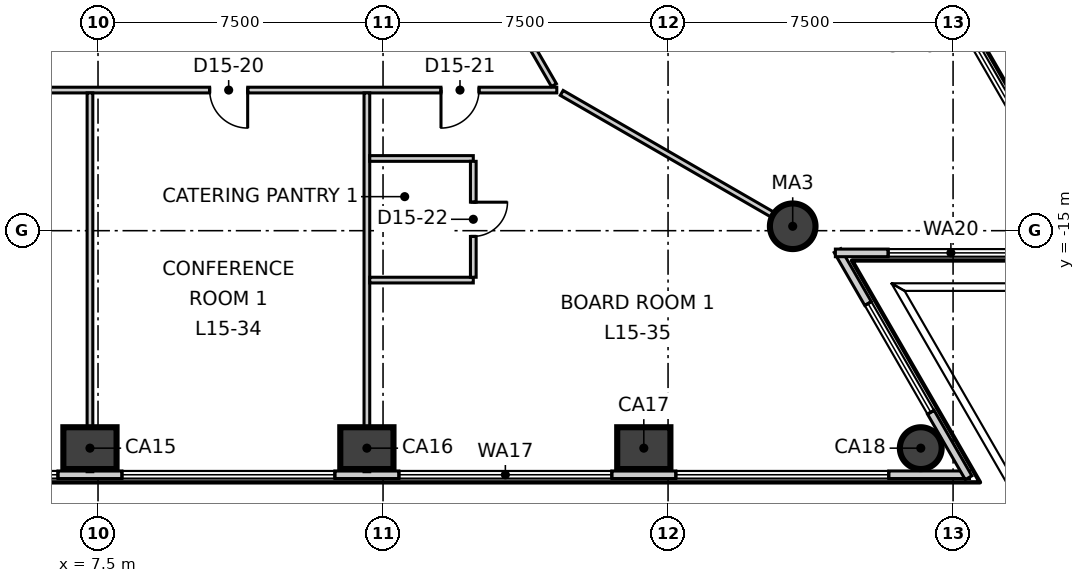
"""IFC4 building model, lengths in metres.
Left out: names, types, materials, properties, quantities, classifications, styles, units other than length and angle.
Written with IfcOpenShell. Run it as: python <this file> out.ifc"""

import sys

from ifc_helpers import new_model, si_unit, direction, frame, frame_2d, origin, origin_2d, place, context, subcontext, project, spatial, rectangle, circle, extrude, element, fill, save


model = new_model("IFC4")
c1 = context("Model", 3, precision=1e-05, world=origin(), true_north=direction((0.0, 1.0)))
c2 = subcontext(c1, "Body", "Model", "MODEL_VIEW")
j1 = project(units=[si_unit("LENGTHUNIT", "METRE"), si_unit("PLANEANGLEUNIT", "RADIAN")], contexts=[c1])
p1 = place(None, origin())
s1 = spatial("IfcSite", under=j1, at=p1, CompositionType="ELEMENT")
p2 = place(p1, origin())
s2 = spatial("IfcBuilding", under=s1, at=p2, CompositionType="ELEMENT")
p3 = place(p2, frame((0.0, 0.0, 71.3)))
s3 = spatial("IfcBuildingStorey", under=s2, at=p3, CompositionType="ELEMENT", Elevation=71.3)
for number, where, z_axis, x_axis in (
    (1, (7.288, -20.722, -0.3), (0.0, 0.0, 1.0), (1.0, 0.0, 0.0)),
    (2, (14.575, -20.722, -0.3), (0.0, 0.0, 1.0), (1.0, 0.0, 0.0)),
    (3, (21.862, -20.722, -0.3), (0.0, 0.0, 1.0), (1.0, 0.0, 0.0)),
):
    element("IfcColumn", number, at=place(p3, frame(where, z_axis=z_axis, x_axis=x_axis)), inside=s3, PredefinedType="COLUMN", context=c2, shape_type="SweptSolid", body=[
        extrude(rectangle(XDim=1.4, YDim=1.1, at=origin_2d()), origin(), (0.0, 0.0, 1.0), 4.0),
    ])
p4 = place(p3, frame((29.15, -20.722, -0.3), z_axis=(0.0, 0.0, 1.0), x_axis=(1.0, 0.0, 0.0)))
e4 = element("IfcColumn", 4, at=p4, inside=s3, PredefinedType="COLUMN", context=c2, shape_type="SweptSolid", body=[
    extrude(circle(Radius=0.55, at=origin_2d()), origin(), (0.0, 0.0, 1.0), 4.0),
])
p5 = place(p3, frame((25.78, -14.884, -0.3), z_axis=(0.0, 0.0, 1.0), x_axis=(1.0, 0.0, 0.0)))
e5 = element("IfcColumn", 5, at=p5, inside=s3, PredefinedType="COLUMN", context=c2, shape_type="SweptSolid", body=[
    extrude(circle(Radius=0.6, at=origin_2d()), origin(), (0.0, 0.0, 1.0), 4.0),
])
p6 = place(p3, frame((-30.453, -21.422, 0.0), z_axis=(0.0, 0.0, 1.0), x_axis=(1.0, 0.0, 0.0)))
e6 = element("IfcWall", 6, at=p6, inside=s3, PredefinedType="ELEMENTEDWALL", context=c2, shape_type="SweptSolid", body=[
    extrude(rectangle(XDim=60.886, YDim=0.2, at=frame_2d((30.443, 0.0))), origin(), (0.0, 0.0, 1.0), 3.7),
])
p7 = place(p6, frame((2.147, 0.0, 0.9)))
e7 = element("IfcOpeningElement", 7, at=p7, cuts=e6, PredefinedType="OPENING", context=c2, shape_type="SweptSolid", body=[
    extrude(rectangle(XDim=5.6, YDim=2.5, at=frame_2d((2.8, 1.25))), frame((0.0, 0.11, 0.0), z_axis=(0.0, -1.0, 0.0), x_axis=(1.0, 0.0, 0.0)), (0.0, 0.0, 1.0), 0.22),
])
p8 = place(p6, frame((9.434, 0.0, 0.9)))
e8 = element("IfcOpeningElement", 8, at=p8, cuts=e6, PredefinedType="OPENING", context=c2, shape_type="SweptSolid", body=[
    extrude(rectangle(XDim=5.6, YDim=2.5, at=frame_2d((2.8, 1.25))), frame((0.0, 0.11, 0.0), z_axis=(0.0, -1.0, 0.0), x_axis=(1.0, 0.0, 0.0)), (0.0, 0.0, 1.0), 0.22),
])
p9 = place(p6, frame((16.722, 0.0, 0.9)))
e9 = element("IfcOpeningElement", 9, at=p9, cuts=e6, PredefinedType="OPENING", context=c2, shape_type="SweptSolid", body=[
    extrude(rectangle(XDim=5.6, YDim=2.5, at=frame_2d((2.8, 1.25))), frame((0.0, 0.11, 0.0), z_axis=(0.0, -1.0, 0.0), x_axis=(1.0, 0.0, 0.0)), (0.0, 0.0, 1.0), 0.22),
])
p10 = place(p6, frame((24.009, 0.0, 0.9)))
e10 = element("IfcOpeningElement", 10, at=p10, cuts=e6, PredefinedType="OPENING", context=c2, shape_type="SweptSolid", body=[
    extrude(rectangle(XDim=5.6, YDim=2.5, at=frame_2d((2.8, 1.25))), frame((0.0, 0.11, 0.0), z_axis=(0.0, -1.0, 0.0), x_axis=(1.0, 0.0, 0.0)), (0.0, 0.0, 1.0), 0.22),
])
p11 = place(p6, frame((31.297, 0.0, 0.9)))
e11 = element("IfcOpeningElement", 11, at=p11, cuts=e6, PredefinedType="OPENING", context=c2, shape_type="SweptSolid", body=[
    extrude(rectangle(XDim=5.6, YDim=2.5, at=frame_2d((2.8, 1.25))), frame((0.0, 0.11, 0.0), z_axis=(0.0, -1.0, 0.0), x_axis=(1.0, 0.0, 0.0)), (0.0, 0.0, 1.0), 0.22),
])
p12 = place(p6, frame((38.584, 0.0, 0.9)))
e12 = element("IfcOpeningElement", 12, at=p12, cuts=e6, PredefinedType="OPENING", context=c2, shape_type="SweptSolid", body=[
    extrude(rectangle(XDim=5.6, YDim=2.5, at=frame_2d((2.8, 1.25))), frame((0.0, 0.11, 0.0), z_axis=(0.0, -1.0, 0.0), x_axis=(1.0, 0.0, 0.0)), (0.0, 0.0, 1.0), 0.22),
])
p13 = place(p6, frame((45.872, 0.0, 0.9)))
e13 = element("IfcOpeningElement", 13, at=p13, cuts=e6, PredefinedType="OPENING", context=c2, shape_type="SweptSolid", body=[
    extrude(rectangle(XDim=5.6, YDim=2.5, at=frame_2d((2.8, 1.25))), frame((0.0, 0.11, 0.0), z_axis=(0.0, -1.0, 0.0), x_axis=(1.0, 0.0, 0.0)), (0.0, 0.0, 1.0), 0.22),
])
p14 = place(p6, frame((53.159, 0.0, 0.9)))
e14 = element("IfcOpeningElement", 14, at=p14, cuts=e6, PredefinedType="OPENING", context=c2, shape_type="SweptSolid", body=[
    extrude(rectangle(XDim=5.6, YDim=2.5, at=frame_2d((2.8, 1.25))), frame((0.0, 0.11, 0.0), z_axis=(0.0, -1.0, 0.0), x_axis=(1.0, 0.0, 0.0)), (0.0, 0.0, 1.0), 0.22),
])
p15 = place(p3, frame((30.408, -21.5, 0.0), z_axis=(0.0, 0.0, 1.0), x_axis=(-0.499902111801, 0.866081912187, 0.0)))
e15 = element("IfcWall", 15, at=p15, inside=s3, PredefinedType="ELEMENTEDWALL", context=c2, shape_type="SweptSolid", body=[
    extrude(rectangle(XDim=6.901, YDim=0.2, at=frame_2d((3.451, 0.0))), origin(), (0.0, 0.0, 1.0), 3.7),
])
p16 = place(p15, frame((1.99, 0.0, 0.9)))
e16 = element("IfcOpeningElement", 16, at=p16, cuts=e15, PredefinedType="OPENING", context=c2, shape_type="SweptSolid", body=[
    extrude(rectangle(XDim=3.3, YDim=2.5, at=frame_2d((1.65, 1.25))), frame((0.0, 0.11, 0.0), z_axis=(0.0, -1.0, 0.0), x_axis=(1.0, 0.0, 0.0)), (0.0, 0.0, 1.0), 0.22),
])
p17 = place(p3, frame((26.903, -15.584, 0.0), z_axis=(0.0, 0.0, 1.0), x_axis=(1.0, 0.0, 0.0)))
e17 = element("IfcWall", 17, at=p17, inside=s3, PredefinedType="ELEMENTEDWALL", context=c2, shape_type="SweptSolid", body=[
    extrude(rectangle(XDim=6.901, YDim=0.2, at=frame_2d((3.45, 0.0))), origin(), (0.0, 0.0, 1.0), 3.7),
])
p18 = place(p17, frame((1.39, 0.0, 0.9)))
e18 = element("IfcOpeningElement", 18, at=p18, cuts=e17, PredefinedType="OPENING", context=c2, shape_type="SweptSolid", body=[
    extrude(rectangle(XDim=3.3, YDim=2.5, at=frame_2d((1.65, 1.25))), frame((0.0, 0.11, 0.0), z_axis=(0.0, -1.0, 0.0), x_axis=(1.0, 0.0, 0.0)), (0.0, 0.0, 1.0), 0.22),
])
p19 = place(p3, frame((33.779, -15.662, 0.0), z_axis=(0.0, 0.0, 1.0), x_axis=(-0.500000131003, 0.86602532815, 0.0)))
e19 = element("IfcWall", 19, at=p19, inside=s3, PredefinedType="ELEMENTEDWALL", context=c2, shape_type="SweptSolid", body=[
    extrude(rectangle(XDim=60.886, YDim=0.2, at=frame_2d((30.443, 0.0))), origin(), (0.0, 0.0, 1.0), 3.7),
])
p20 = place(p19, frame((2.147, 0.0, 0.9)))
e20 = element("IfcOpeningElement", 20, at=p20, cuts=e19, PredefinedType="OPENING", context=c2, shape_type="SweptSolid", body=[
    extrude(rectangle(XDim=5.6, YDim=2.5, at=frame_2d((2.8, 1.25))), frame((0.0, 0.11, 0.0), z_axis=(0.0, -1.0, 0.0), x_axis=(1.0, 0.0, 0.0)), (0.0, 0.0, 1.0), 0.22),
])
p21 = place(p19, frame((9.434, 0.0, 0.9)))
e21 = element("IfcOpeningElement", 21, at=p21, cuts=e19, PredefinedType="OPENING", context=c2, shape_type="SweptSolid", body=[
    extrude(rectangle(XDim=5.6, YDim=2.5, at=frame_2d((2.8, 1.25))), frame((0.0, 0.11, 0.0), z_axis=(0.0, -1.0, 0.0), x_axis=(1.0, 0.0, 0.0)), (0.0, 0.0, 1.0), 0.22),
])
p22 = place(p19, frame((16.722, 0.0, 0.9)))
e22 = element("IfcOpeningElement", 22, at=p22, cuts=e19, PredefinedType="OPENING", context=c2, shape_type="SweptSolid", body=[
    extrude(rectangle(XDim=5.6, YDim=2.5, at=frame_2d((2.8, 1.25))), frame((0.0, 0.11, 0.0), z_axis=(0.0, -1.0, 0.0), x_axis=(1.0, 0.0, 0.0)), (0.0, 0.0, 1.0), 0.22),
])
p23 = place(p19, frame((24.009, 0.0, 0.9)))
e23 = element("IfcOpeningElement", 23, at=p23, cuts=e19, PredefinedType="OPENING", context=c2, shape_type="SweptSolid", body=[
    extrude(rectangle(XDim=5.6, YDim=2.5, at=frame_2d((2.8, 1.25))), frame((0.0, 0.11, 0.0), z_axis=(0.0, -1.0, 0.0), x_axis=(1.0, 0.0, 0.0)), (0.0, 0.0, 1.0), 0.22),
])
p24 = place(p19, frame((31.297, 0.0, 0.9)))
e24 = element("IfcOpeningElement", 24, at=p24, cuts=e19, PredefinedType="OPENING", context=c2, shape_type="SweptSolid", body=[
    extrude(rectangle(XDim=5.6, YDim=2.5, at=frame_2d((2.8, 1.25))), frame((0.0, 0.11, 0.0), z_axis=(0.0, -1.0, 0.0), x_axis=(1.0, 0.0, 0.0)), (0.0, 0.0, 1.0), 0.22),
])
p25 = place(p19, frame((38.584, 0.0, 0.9)))
e25 = element("IfcOpeningElement", 25, at=p25, cuts=e19, PredefinedType="OPENING", context=c2, shape_type="SweptSolid", body=[
    extrude(rectangle(XDim=5.6, YDim=2.5, at=frame_2d((2.8, 1.25))), frame((0.0, 0.11, 0.0), z_axis=(0.0, -1.0, 0.0), x_axis=(1.0, 0.0, 0.0)), (0.0, 0.0, 1.0), 0.22),
])
p26 = place(p19, frame((45.872, 0.0, 0.9)))
e26 = element("IfcOpeningElement", 26, at=p26, cuts=e19, PredefinedType="OPENING", context=c2, shape_type="SweptSolid", body=[
    extrude(rectangle(XDim=5.6, YDim=2.5, at=frame_2d((2.8, 1.25))), frame((0.0, 0.11, 0.0), z_axis=(0.0, -1.0, 0.0), x_axis=(1.0, 0.0, 0.0)), (0.0, 0.0, 1.0), 0.22),
])
p27 = place(p19, frame((53.16, 0.0, 0.9)))
e27 = element("IfcOpeningElement", 27, at=p27, cuts=e19, PredefinedType="OPENING", context=c2, shape_type="SweptSolid", body=[
    extrude(rectangle(XDim=5.6, YDim=2.5, at=frame_2d((2.8, 1.25))), frame((0.0, 0.11, 0.0), z_axis=(0.0, -1.0, 0.0), x_axis=(1.0, 0.0, 0.0)), (0.0, 0.0, 1.0), 0.22),
])
p28 = place(p3, frame((-19.422, -11.3, 0.0), z_axis=(0.0, 0.0, 1.0), x_axis=(1.0, 0.0, 0.0)))
e28 = element("IfcWall", 28, at=p28, inside=s3, PredefinedType="PARTITIONING", context=c2, shape_type="SweptSolid", body=[
    extrude(rectangle(XDim=38.994, YDim=0.15, at=frame_2d((19.497, 0.0))), origin(), (0.0, 0.0, 1.0), 3.7),
])
p29 = place(p28, frame((1.8, 0.0, 0.0)))
e29 = element("IfcOpeningElement", 29, at=p29, cuts=e28, PredefinedType="OPENING", context=c2, shape_type="SweptSolid", body=[
    extrude(rectangle(XDim=1.1, YDim=2.1, at=frame_2d((0.55, 1.05))), frame((0.0, 0.085, 0.0), z_axis=(0.0, -1.0, 0.0), x_axis=(1.0, 0.0, 0.0)), (0.0, 0.0, 1.0), 0.17),
])
p30 = place(p28, frame((9.197, 0.0, 0.0)))
e30 = element("IfcOpeningElement", 30, at=p30, cuts=e28, PredefinedType="OPENING", context=c2, shape_type="SweptSolid", body=[
    extrude(rectangle(XDim=1.0, YDim=2.1, at=frame_2d((0.5, 1.05))), frame((0.0, 0.085, 0.0), z_axis=(0.0, -1.0, 0.0), x_axis=(1.0, 0.0, 0.0)), (0.0, 0.0, 1.0), 0.17),
])
p31 = place(p28, frame((5.597, 0.0, 0.0)))
e31 = element("IfcOpeningElement", 31, at=p31, cuts=e28, PredefinedType="OPENING", context=c2, shape_type="SweptSolid", body=[
    extrude(rectangle(XDim=0.9, YDim=2.1, at=frame_2d((0.45, 1.05))), frame((0.0, 0.085, 0.0), z_axis=(0.0, -1.0, 0.0), x_axis=(1.0, 0.0, 0.0)), (0.0, 0.0, 1.0), 0.17),
])
p32 = place(p28, frame((23.284, 0.0, 0.0)))
e32 = element("IfcOpeningElement", 32, at=p32, cuts=e28, PredefinedType="OPENING", context=c2, shape_type="SweptSolid", body=[
    extrude(rectangle(XDim=1.1, YDim=2.1, at=frame_2d((0.55, 1.05))), frame((0.0, 0.085, 0.0), z_axis=(0.0, -1.0, 0.0), x_axis=(1.0, 0.0, 0.0)), (0.0, 0.0, 1.0), 0.17),
])
p33 = place(p28, frame((13.284, 0.0, 0.0)))
e33 = element("IfcOpeningElement", 33, at=p33, cuts=e28, PredefinedType="OPENING", context=c2, shape_type="SweptSolid", body=[
    extrude(rectangle(XDim=0.9, YDim=2.1, at=frame_2d((0.45, 1.05))), frame((0.0, 0.085, 0.0), z_axis=(0.0, -1.0, 0.0), x_axis=(1.0, 0.0, 0.0)), (0.0, 0.0, 1.0), 0.17),
])
p34 = place(p28, frame((16.484, 0.0, 0.0)))
e34 = element("IfcOpeningElement", 34, at=p34, cuts=e28, PredefinedType="OPENING", context=c2, shape_type="SweptSolid", body=[
    extrude(rectangle(XDim=0.9, YDim=2.1, at=frame_2d((0.45, 1.05))), frame((0.0, 0.085, 0.0), z_axis=(0.0, -1.0, 0.0), x_axis=(1.0, 0.0, 0.0)), (0.0, 0.0, 1.0), 0.17),
])
p35 = place(p28, frame((19.184, 0.0, 0.0)))
e35 = element("IfcOpeningElement", 35, at=p35, cuts=e28, PredefinedType="OPENING", context=c2, shape_type="SweptSolid", body=[
    extrude(rectangle(XDim=1.0, YDim=2.1, at=frame_2d((0.5, 1.05))), frame((0.0, 0.085, 0.0), z_axis=(0.0, -1.0, 0.0), x_axis=(1.0, 0.0, 0.0)), (0.0, 0.0, 1.0), 0.17),
])
p36 = place(p28, frame((29.86, 0.0, 0.0)))
e36 = element("IfcOpeningElement", 36, at=p36, cuts=e28, PredefinedType="OPENING", context=c2, shape_type="SweptSolid", body=[
    extrude(rectangle(XDim=1.0, YDim=2.1, at=frame_2d((0.5, 1.05))), frame((0.0, 0.085, 0.0), z_axis=(0.0, -1.0, 0.0), x_axis=(1.0, 0.0, 0.0)), (0.0, 0.0, 1.0), 0.17),
])
p37 = place(p28, frame((35.947, 0.0, 0.0)))
e37 = element("IfcOpeningElement", 37, at=p37, cuts=e28, PredefinedType="OPENING", context=c2, shape_type="SweptSolid", body=[
    extrude(rectangle(XDim=1.0, YDim=2.1, at=frame_2d((0.5, 1.05))), frame((0.0, 0.085, 0.0), z_axis=(0.0, -1.0, 0.0), x_axis=(1.0, 0.0, 0.0)), (0.0, 0.0, 1.0), 0.17),
])
p38 = place(p3, frame((19.702, -11.375, 0.0), z_axis=(0.0, 0.0, 1.0), x_axis=(0.866029632557, -0.499992675479, 0.0)))
e38 = element("IfcWall", 38, at=p38, inside=s3, PredefinedType="PARTITIONING", context=c2, shape_type="SweptSolid", body=[
    extrude(rectangle(XDim=7.638, YDim=0.15, at=frame_2d((3.819, 0.0))), origin(), (0.0, 0.0, 1.0), 3.1),
])
p39 = place(p3, frame((0.075, 22.47, 0.0), z_axis=(0.0, 0.0, 1.0), x_axis=(0.500002280369, -0.866024087209, 0.0)))
e39 = element("IfcWall", 39, at=p39, inside=s3, PredefinedType="PARTITIONING", context=c2, shape_type="SweptSolid", body=[
    extrude(rectangle(XDim=38.844, YDim=0.15, at=frame_2d((19.422, 0.0))), origin(), (0.0, 0.0, 1.0), 3.7),
])
p40 = place(p39, frame((35.944, 0.0, 0.0)))
e40 = element("IfcOpeningElement", 40, at=p40, cuts=e39, PredefinedType="OPENING", context=c2, shape_type="SweptSolid", body=[
    extrude(rectangle(XDim=1.1, YDim=2.1, at=frame_2d((0.55, 1.05))), frame((0.0, 0.085, 0.0), z_axis=(0.0, -1.0, 0.0), x_axis=(1.0, 0.0, 0.0)), (0.0, 0.0, 1.0), 0.17),
])
p41 = place(p39, frame((29.848, 0.0, 0.0)))
e41 = element("IfcOpeningElement", 41, at=p41, cuts=e39, PredefinedType="OPENING", context=c2, shape_type="SweptSolid", body=[
    extrude(rectangle(XDim=1.0, YDim=2.1, at=frame_2d((0.5, 1.05))), frame((0.0, 0.085, 0.0), z_axis=(0.0, -1.0, 0.0), x_axis=(1.0, 0.0, 0.0)), (0.0, 0.0, 1.0), 0.17),
])
p42 = place(p39, frame((14.46, 0.0, 0.0)))
e42 = element("IfcOpeningElement", 42, at=p42, cuts=e39, PredefinedType="OPENING", context=c2, shape_type="SweptSolid", body=[
    extrude(rectangle(XDim=1.1, YDim=2.1, at=frame_2d((0.55, 1.05))), frame((0.0, 0.085, 0.0), z_axis=(0.0, -1.0, 0.0), x_axis=(1.0, 0.0, 0.0)), (0.0, 0.0, 1.0), 0.17),
])
p43 = place(p39, frame((24.66, 0.0, 0.0)))
e43 = element("IfcOpeningElement", 43, at=p43, cuts=e39, PredefinedType="OPENING", context=c2, shape_type="SweptSolid", body=[
    extrude(rectangle(XDim=0.9, YDim=2.1, at=frame_2d((0.45, 1.05))), frame((0.0, 0.085, 0.0), z_axis=(0.0, -1.0, 0.0), x_axis=(1.0, 0.0, 0.0)), (0.0, 0.0, 1.0), 0.17),
])
p44 = place(p39, frame((21.46, 0.0, 0.0)))
e44 = element("IfcOpeningElement", 44, at=p44, cuts=e39, PredefinedType="OPENING", context=c2, shape_type="SweptSolid", body=[
    extrude(rectangle(XDim=0.9, YDim=2.1, at=frame_2d((0.45, 1.05))), frame((0.0, 0.085, 0.0), z_axis=(0.0, -1.0, 0.0), x_axis=(1.0, 0.0, 0.0)), (0.0, 0.0, 1.0), 0.17),
])
p45 = place(p39, frame((18.66, 0.0, 0.0)))
e45 = element("IfcOpeningElement", 45, at=p45, cuts=e39, PredefinedType="OPENING", context=c2, shape_type="SweptSolid", body=[
    extrude(rectangle(XDim=1.0, YDim=2.1, at=frame_2d((0.5, 1.05))), frame((0.0, 0.085, 0.0), z_axis=(0.0, -1.0, 0.0), x_axis=(1.0, 0.0, 0.0)), (0.0, 0.0, 1.0), 0.17),
])
p46 = place(p39, frame((6.785, 0.0, 0.0)))
e46 = element("IfcOpeningElement", 46, at=p46, cuts=e39, PredefinedType="OPENING", context=c2, shape_type="SweptSolid", body=[
    extrude(rectangle(XDim=1.0, YDim=2.1, at=frame_2d((0.5, 1.05))), frame((0.0, 0.085, 0.0), z_axis=(0.0, -1.0, 0.0), x_axis=(1.0, 0.0, 0.0)), (0.0, 0.0, 1.0), 0.17),
])
p47 = place(p39, frame((10.485, 0.0, 0.0)))
e47 = element("IfcOpeningElement", 47, at=p47, cuts=e39, PredefinedType="OPENING", context=c2, shape_type="SweptSolid", body=[
    extrude(rectangle(XDim=0.9, YDim=2.1, at=frame_2d((0.45, 1.05))), frame((0.0, 0.085, 0.0), z_axis=(0.0, -1.0, 0.0), x_axis=(1.0, 0.0, 0.0)), (0.0, 0.0, 1.0), 0.17),
])
p48 = place(p39, frame((1.796, 0.0, 0.0)))
e48 = element("IfcOpeningElement", 48, at=p48, cuts=e39, PredefinedType="OPENING", context=c2, shape_type="SweptSolid", body=[
    extrude(rectangle(XDim=1.1, YDim=2.1, at=frame_2d((0.55, 1.05))), frame((0.0, 0.085, 0.0), z_axis=(0.0, -1.0, 0.0), x_axis=(1.0, 0.0, 0.0)), (0.0, 0.0, 1.0), 0.17),
])
for number, where, z_axis, x_axis in (
    (49, (7.288, -21.342, 0.0), (0.0, 0.0, 1.0), (0.0, 1.0, 0.0)),
    (50, (14.575, -21.342, 0.0), (0.0, 0.0, 1.0), (0.0, 1.0, 0.0)),
):
    element("IfcWall", number, at=place(p3, frame(where, z_axis=z_axis, x_axis=x_axis)), inside=s3, PredefinedType="PARTITIONING", context=c2, shape_type="SweptSolid", body=[
        extrude(rectangle(XDim=9.967, YDim=0.15, at=frame_2d((4.983, 0.0))), origin(), (0.0, 0.0, 1.0), 3.7),
    ])
for number, where, z_axis, x_axis in (
    (51, (14.65, -13.1, 0.0), (0.0, 0.0, 1.0), (1.0, 0.0, 0.0)),
    (52, (14.65, -16.3, 0.0), (0.0, 0.0, 1.0), (1.0, 0.0, 0.0)),
):
    element("IfcWall", number, at=place(p3, frame(where, z_axis=z_axis, x_axis=x_axis)), inside=s3, PredefinedType="PARTITIONING", context=c2, shape_type="SweptSolid", body=[
        extrude(rectangle(XDim=2.725, YDim=0.15, at=frame_2d((1.363, 0.0))), origin(), (0.0, 0.0, 1.0), 3.7),
    ])
p49 = place(p3, frame((17.375, -16.225, 0.0), z_axis=(0.0, 0.0, 1.0), x_axis=(0.0, 1.0, 0.0)))
e53 = element("IfcWall", 53, at=p49, inside=s3, PredefinedType="PARTITIONING", context=c2, shape_type="SweptSolid", body=[
    extrude(rectangle(XDim=3.05, YDim=0.15, at=frame_2d((1.525, 0.0))), origin(), (0.0, 0.0, 1.0), 3.7),
])
p50 = place(p49, frame((1.075, 0.0, 0.0)))
e54 = element("IfcOpeningElement", 54, at=p50, cuts=e53, PredefinedType="OPENING", context=c2, shape_type="SweptSolid", body=[
    extrude(rectangle(XDim=0.9, YDim=2.1, at=frame_2d((0.45, 1.05))), frame((0.0, 0.085, 0.0), z_axis=(0.0, -1.0, 0.0), x_axis=(1.0, 0.0, 0.0)), (0.0, 0.0, 1.0), 0.17),
])
p51 = place(p11, origin())
e55 = element("IfcWindow", 55, at=p51, inside=s3, PartitioningType="SINGLE_PANEL", PredefinedType="WINDOW", context=c2, shape_type="SweptSolid", body=[
    extrude(rectangle(XDim=5.6, YDim=2.5, at=frame_2d((2.8, 1.25))), frame((0.0, 0.03, 0.0), z_axis=(0.0, -1.0, 0.0), x_axis=(1.0, 0.0, 0.0)), (0.0, 0.0, 1.0), 0.06),
])
fill(e11, e55)
p52 = place(p12, origin())
e56 = element("IfcWindow", 56, at=p52, inside=s3, PartitioningType="SINGLE_PANEL", PredefinedType="WINDOW", context=c2, shape_type="SweptSolid", body=[
    extrude(rectangle(XDim=5.6, YDim=2.5, at=frame_2d((2.8, 1.25))), frame((0.0, 0.03, 0.0), z_axis=(0.0, -1.0, 0.0), x_axis=(1.0, 0.0, 0.0)), (0.0, 0.0, 1.0), 0.06),
])
fill(e12, e56)
p53 = place(p13, origin())
e57 = element("IfcWindow", 57, at=p53, inside=s3, PartitioningType="SINGLE_PANEL", PredefinedType="WINDOW", context=c2, shape_type="SweptSolid", body=[
    extrude(rectangle(XDim=5.6, YDim=2.5, at=frame_2d((2.8, 1.25))), frame((0.0, 0.03, 0.0), z_axis=(0.0, -1.0, 0.0), x_axis=(1.0, 0.0, 0.0)), (0.0, 0.0, 1.0), 0.06),
])
fill(e13, e57)
p54 = place(p14, origin())
e58 = element("IfcWindow", 58, at=p54, inside=s3, PartitioningType="SINGLE_PANEL", PredefinedType="WINDOW", context=c2, shape_type="SweptSolid", body=[
    extrude(rectangle(XDim=5.6, YDim=2.5, at=frame_2d((2.8, 1.25))), frame((0.0, 0.03, 0.0), z_axis=(0.0, -1.0, 0.0), x_axis=(1.0, 0.0, 0.0)), (0.0, 0.0, 1.0), 0.06),
])
fill(e14, e58)
p55 = place(p16, origin())
e59 = element("IfcWindow", 59, at=p55, inside=s3, PartitioningType="SINGLE_PANEL", PredefinedType="WINDOW", context=c2, shape_type="SweptSolid", body=[
    extrude(rectangle(XDim=3.3, YDim=2.5, at=frame_2d((1.65, 1.25))), frame((0.0, 0.03, 0.0), z_axis=(0.0, -1.0, 0.0), x_axis=(1.0, 0.0, 0.0)), (0.0, 0.0, 1.0), 0.06),
])
fill(e16, e59)
p56 = place(p18, origin())
e60 = element("IfcWindow", 60, at=p56, inside=s3, PartitioningType="SINGLE_PANEL", PredefinedType="WINDOW", context=c2, shape_type="SweptSolid", body=[
    extrude(rectangle(XDim=3.3, YDim=2.5, at=frame_2d((1.65, 1.25))), frame((0.0, 0.03, 0.0), z_axis=(0.0, -1.0, 0.0), x_axis=(1.0, 0.0, 0.0)), (0.0, 0.0, 1.0), 0.06),
])
fill(e18, e60)
p57 = place(p20, origin())
e61 = element("IfcWindow", 61, at=p57, inside=s3, PartitioningType="SINGLE_PANEL", PredefinedType="WINDOW", context=c2, shape_type="SweptSolid", body=[
    extrude(rectangle(XDim=5.6, YDim=2.5, at=frame_2d((2.8, 1.25))), frame((0.0, 0.03, 0.0), z_axis=(0.0, -1.0, 0.0), x_axis=(1.0, 0.0, 0.0)), (0.0, 0.0, 1.0), 0.06),
])
fill(e20, e61)
p58 = place(p36, origin())
e62 = element("IfcDoor", 62, at=p58, inside=s3, OperationType="SINGLE_SWING_RIGHT", PredefinedType="DOOR", context=c2, shape_type="SweptSolid", body=[
    extrude(rectangle(XDim=1.0, YDim=2.1, at=frame_2d((0.5, 1.05))), frame((0.0, 0.025, 0.0), z_axis=(0.0, -1.0, 0.0), x_axis=(1.0, 0.0, 0.0)), (0.0, 0.0, 1.0), 0.05),
])
fill(e36, e62)
p59 = place(p37, origin())
e63 = element("IfcDoor", 63, at=p59, inside=s3, OperationType="SINGLE_SWING_LEFT", PredefinedType="DOOR", context=c2, shape_type="SweptSolid", body=[
    extrude(rectangle(XDim=1.0, YDim=2.1, at=frame_2d((0.5, 1.05))), frame((0.0, 0.025, 0.0), z_axis=(0.0, -1.0, 0.0), x_axis=(1.0, 0.0, 0.0)), (0.0, 0.0, 1.0), 0.05),
])
fill(e37, e63)
p60 = place(p50, origin())
e64 = element("IfcDoor", 64, at=p60, inside=s3, OperationType="SINGLE_SWING_RIGHT", PredefinedType="DOOR", context=c2, shape_type="SweptSolid", body=[
    extrude(rectangle(XDim=0.9, YDim=2.1, at=frame_2d((0.45, 1.05))), frame((0.0, 0.025, 0.0), z_axis=(0.0, -1.0, 0.0), x_axis=(1.0, 0.0, 0.0)), (0.0, 0.0, 1.0), 0.05),
])
fill(e54, e64)
save(model, sys.argv[1])
